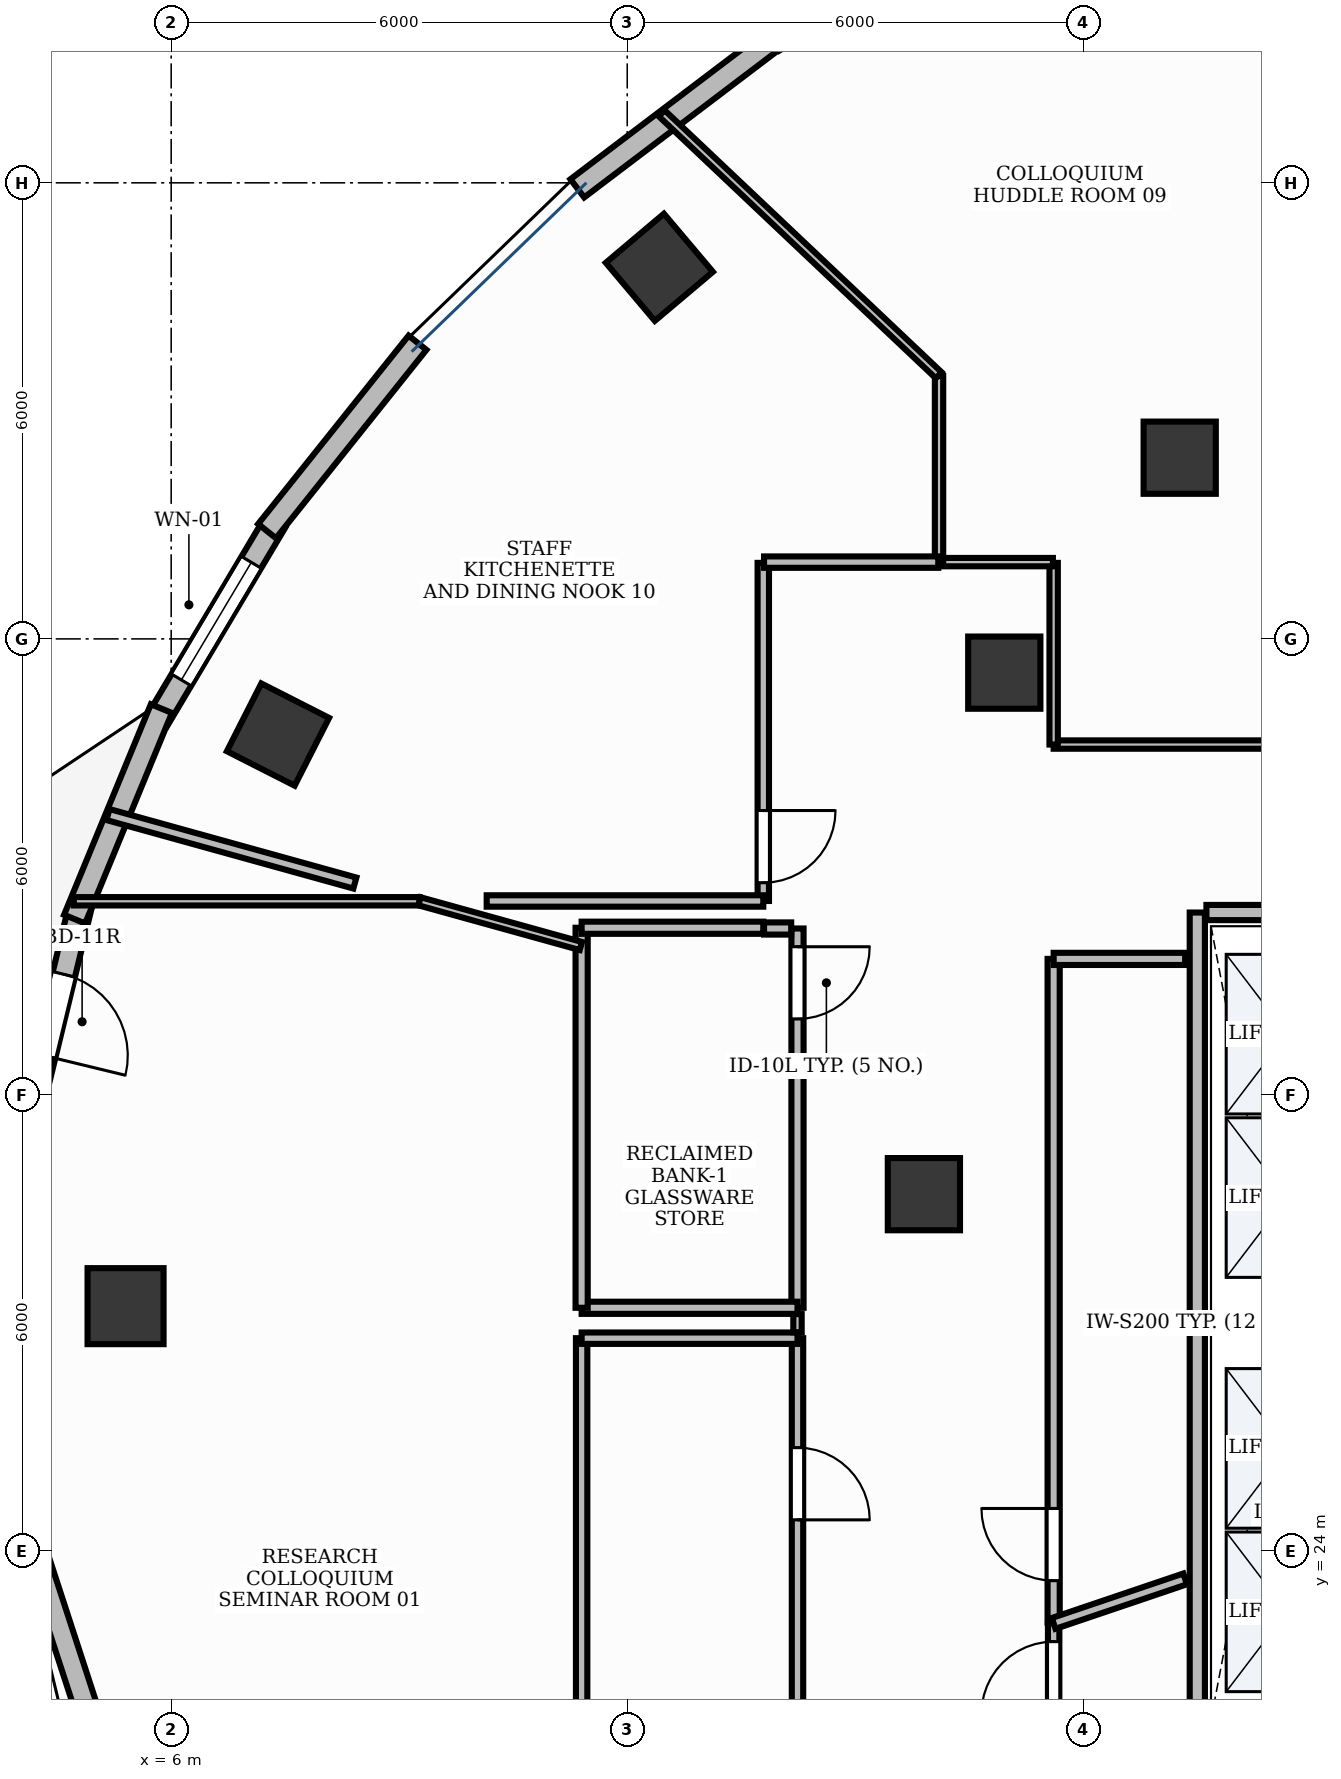
"""IFC4 building model, lengths in metres.
Left out: names, types, materials, properties, quantities, classifications, styles, units other than length and angle.
Written with IfcOpenShell. Run it as: python <this file> out.ifc"""

import sys

from ifc_helpers import new_model, si_unit, direction, frame, frame_2d, origin, origin_2d, place, context, subcontext, project, spatial, rectangle, extrude, element, fill, save


model = new_model("IFC4")
c1 = context("Model", 3, precision=1e-05, world=origin(), true_north=direction((0.0, 1.0)))
c2 = subcontext(c1, "Body", "Model", "MODEL_VIEW")
j1 = project(units=[si_unit("LENGTHUNIT", "METRE"), si_unit("PLANEANGLEUNIT", "RADIAN")], contexts=[c1])
p1 = place(None, origin())
s1 = spatial("IfcSite", under=j1, at=p1, CompositionType="ELEMENT")
p2 = place(p1, origin())
s2 = spatial("IfcBuilding", under=s1, at=p2, CompositionType="ELEMENT")
p3 = place(p2, frame((0.0, 0.0, 231.0)))
s3 = spatial("IfcBuildingStorey", under=s2, at=p3, CompositionType="ELEMENT", Elevation=231.0)
p4 = place(p3, frame((12.423, 40.889, -0.0), z_axis=(0.0, 0.0, 1.0), x_axis=(0.764246456939, 0.644924300253, 0.0)))
e1 = element("IfcColumn", 1, at=p4, inside=s3, PredefinedType="COLUMN", context=c2, shape_type="SweptSolid", body=[
    extrude(rectangle(XDim=1.0, YDim=1.0, at=origin_2d()), origin(), (0.0, 0.0, 1.0), 3.901),
])
p5 = place(p3, frame((19.268, 38.384, -0.0), z_axis=(0.0, 0.0, 1.0), x_axis=(1.0, 0.0, 0.0)))
e2 = element("IfcColumn", 2, at=p5, inside=s3, PredefinedType="COLUMN", context=c2, shape_type="SweptSolid", body=[
    extrude(rectangle(XDim=0.95, YDim=0.95, at=origin_2d()), origin(), (0.0, 0.0, 1.0), 3.901),
])
p6 = place(p3, frame((7.405, 34.741, -0.0), z_axis=(0.0, 0.0, 1.0), x_axis=(0.453057191132, 0.891481453292, 0.0)))
e3 = element("IfcColumn", 3, at=p6, inside=s3, PredefinedType="COLUMN", context=c2, shape_type="SweptSolid", body=[
    extrude(rectangle(XDim=1.0, YDim=1.0, at=origin_2d()), origin(), (0.0, 0.0, 1.0), 3.901),
])
p7 = place(p3, frame((16.96, 35.556, -0.0), z_axis=(0.0, 0.0, 1.0), x_axis=(1.0, 0.0, 0.0)))
e4 = element("IfcColumn", 4, at=p7, inside=s3, PredefinedType="COLUMN", context=c2, shape_type="SweptSolid", body=[
    extrude(rectangle(XDim=0.95, YDim=0.95, at=origin_2d()), origin(), (0.0, 0.0, 1.0), 3.901),
])
p8 = place(p3, frame((5.4, 27.222, -0.0), z_axis=(0.0, 0.0, 1.0), x_axis=(0.0, 1.0, 0.0)))
e5 = element("IfcColumn", 5, at=p8, inside=s3, PredefinedType="COLUMN", context=c2, shape_type="SweptSolid", body=[
    extrude(rectangle(XDim=1.0, YDim=1.0, at=origin_2d()), origin(), (0.0, 0.0, 1.0), 3.901),
])
p9 = place(p3, frame((15.903, 28.695, -0.0), z_axis=(0.0, 0.0, 1.0), x_axis=(1.0, 0.0, 0.0)))
e6 = element("IfcColumn", 6, at=p9, inside=s3, PredefinedType="COLUMN", context=c2, shape_type="SweptSolid", body=[
    extrude(rectangle(XDim=0.95, YDim=0.95, at=origin_2d()), origin(), (0.0, 0.0, 1.0), 3.901),
])
p10 = place(p3, frame((7.37, 37.538, 0.0), z_axis=(0.0, 0.0, 1.0), x_axis=(-0.511263271049, -0.859424148879, 0.0)))
e7 = element("IfcWall", 7, at=p10, inside=s3, PredefinedType="STANDARD", context=c2, shape_type="SweptSolid", body=[
    extrude(rectangle(XDim=3.036, YDim=0.3, at=frame_2d((1.518, 0.0))), origin(), (0.0, 0.0, 1.0), 3.47),
])
p11 = place(p10, frame((0.618, 0.0, 0.9)))
e8 = element("IfcOpeningElement", 8, at=p11, cuts=e7, PredefinedType="OPENING", context=c2, shape_type="SweptSolid", body=[
    extrude(rectangle(XDim=1.8, YDim=2.1, at=frame_2d((0.9, 1.05))), frame((0.0, 0.165, 0.0), z_axis=(0.0, -1.0, 0.0), x_axis=(1.0, 0.0, 0.0)), (0.0, 0.0, 1.0), 0.33),
])
p12 = place(p3, frame((4.8, 32.461, 0.0), z_axis=(0.0, 0.0, 1.0), x_axis=(-0.23549395731, -0.971875813091, 0.0)))
e9 = element("IfcWall", 9, at=p12, inside=s3, PredefinedType="STANDARD", context=c2, shape_type="SweptSolid", body=[
    extrude(rectangle(XDim=2.899, YDim=0.3, at=frame_2d((1.449, 0.0))), origin(), (0.0, 0.0, 1.0), 3.9),
])
p13 = place(p12, frame((0.899, 0.0, 0.0)))
e10 = element("IfcOpeningElement", 10, at=p13, cuts=e9, PredefinedType="OPENING", context=c2, shape_type="SweptSolid", body=[
    extrude(rectangle(XDim=1.1, YDim=2.15, at=frame_2d((0.55, 1.075))), frame((0.0, 0.165, 0.0), z_axis=(0.0, -1.0, 0.0), x_axis=(1.0, 0.0, 0.0)), (0.0, 0.0, 1.0), 0.33),
])
p14 = place(p3, frame((14.041, 43.973, 0.0), z_axis=(0.0, 0.0, 1.0), x_axis=(-0.796917512891, -0.604088137317, 0.0)))
e11 = element("IfcWall", 11, at=p14, inside=s3, PredefinedType="STANDARD", context=c2, shape_type="SweptSolid", body=[
    extrude(rectangle(XDim=3.385, YDim=0.3, at=frame_2d((1.693, 0.0))), origin(), (0.0, 0.0, 1.0), 3.9),
])
p15 = place(p3, frame((9.241, 39.896, 0.0), z_axis=(0.0, 0.0, 1.0), x_axis=(-0.624084641886, -0.781356742956, 0.0)))
e12 = element("IfcWall", 12, at=p15, inside=s3, PredefinedType="STANDARD", context=c2, shape_type="SweptSolid", body=[
    extrude(rectangle(XDim=3.171, YDim=0.3, at=frame_2d((1.586, 0.0))), origin(), (0.0, 0.0, 1.0), 3.47),
])
p16 = place(p3, frame((5.871, 35.083, 0.0), z_axis=(0.0, 0.0, 1.0), x_axis=(-0.380967021775, -0.924588626536, 0.0)))
e13 = element("IfcWall", 13, at=p16, inside=s3, PredefinedType="STANDARD", context=c2, shape_type="SweptSolid", body=[
    extrude(rectangle(XDim=2.996, YDim=0.3, at=frame_2d((1.498, 0.0))), origin(), (0.0, 0.0, 1.0), 3.9),
])
p17 = place(p3, frame((4.084, 24.379, 0.0), z_axis=(0.0, 0.0, 1.0), x_axis=(0.309937285623, -0.95075700312, 0.0)))
e14 = element("IfcWall", 14, at=p17, inside=s3, PredefinedType="STANDARD", context=c2, shape_type="SweptSolid", body=[
    extrude(rectangle(XDim=5.758, YDim=0.3, at=frame_2d((2.879, 0.0))), origin(), (0.0, 0.0, 1.0), 3.9),
])
p18 = place(p3, frame((19.5, 21.6, 0.0), z_axis=(0.0, 0.0, 1.0), x_axis=(0.0, 1.0, 0.0)))
e15 = element("IfcWall", 15, at=p18, inside=s3, PredefinedType="PARTITIONING", context=c2, shape_type="SweptSolid", body=[
    extrude(rectangle(XDim=10.8, YDim=0.2, at=frame_2d((5.4, 0.0))), origin(), (0.0, 0.0, 1.0), 2.91),
])
p19 = place(p3, frame((19.62, 32.4, 0.0), z_axis=(0.0, 0.0, 1.0), x_axis=(1.0, 0.0, 0.0)))
e16 = element("IfcWall", 16, at=p19, inside=s3, PredefinedType="PARTITIONING", context=c2, shape_type="SweptSolid", body=[
    extrude(rectangle(XDim=2.11, YDim=0.2, at=frame_2d((1.055, 0.0))), origin(), (0.0, 0.0, 1.0), 2.91),
])
p20 = place(p3, frame((14.24, 26.8, 0.0), z_axis=(0.0, 0.0, 1.0), x_axis=(0.0, -1.0, 0.0)))
e17 = element("IfcWall", 17, at=p20, inside=s3, PredefinedType="PARTITIONING", context=c2, shape_type="SweptSolid", body=[
    extrude(rectangle(XDim=4.99, YDim=0.15, at=frame_2d((2.495, 0.0))), origin(), (0.0, 0.0, 1.0), 2.91),
])
p21 = place(p20, frame((1.44, 0.0, 0.0)))
e18 = element("IfcOpeningElement", 18, at=p21, cuts=e17, PredefinedType="OPENING", context=c2, shape_type="SweptSolid", body=[
    extrude(rectangle(XDim=0.95, YDim=2.15, at=frame_2d((0.475, 1.075))), frame((0.0, 0.09, 0.0), z_axis=(0.0, -1.0, 0.0), x_axis=(1.0, 0.0, 0.0)), (0.0, 0.0, 1.0), 0.18),
])
p22 = place(p3, frame((14.24, 32.19, 0.0), z_axis=(0.0, 0.0, 1.0), x_axis=(0.0, -1.0, 0.0)))
e19 = element("IfcWall", 19, at=p22, inside=s3, PredefinedType="PARTITIONING", context=c2, shape_type="SweptSolid", body=[
    extrude(rectangle(XDim=4.99, YDim=0.16, at=frame_2d((2.495, 0.0))), origin(), (0.0, 0.0, 1.0), 2.91),
])
p23 = place(p22, frame((0.24, 0.0, 0.0)))
e20 = element("IfcOpeningElement", 20, at=p23, cuts=e19, PredefinedType="OPENING", context=c2, shape_type="SweptSolid", body=[
    extrude(rectangle(XDim=0.95, YDim=2.15, at=frame_2d((0.475, 1.075))), frame((0.0, 0.095, 0.0), z_axis=(0.0, -1.0, 0.0), x_axis=(1.0, 0.0, 0.0)), (0.0, 0.0, 1.0), 0.19),
])
p24 = place(p3, frame((17.61, 16.41, 0.0), z_axis=(0.0, 0.0, 1.0), x_axis=(0.0, 1.0, 0.0)))
e21 = element("IfcWall", 21, at=p24, inside=s3, PredefinedType="PARTITIONING", context=c2, shape_type="SweptSolid", body=[
    extrude(rectangle(XDim=6.638, YDim=0.15, at=frame_2d((3.319, 0.0))), origin(), (0.0, 0.0, 1.0), 2.91),
])
p25 = place(p24, frame((5.448, 0.0, 0.0)))
e22 = element("IfcOpeningElement", 22, at=p25, cuts=e21, PredefinedType="OPENING", context=c2, shape_type="SweptSolid", body=[
    extrude(rectangle(XDim=0.95, YDim=2.15, at=frame_2d((0.475, 1.075))), frame((0.0, 0.09, 0.0), z_axis=(0.0, -1.0, 0.0), x_axis=(1.0, 0.0, 0.0)), (0.0, 0.0, 1.0), 0.18),
])
p26 = place(p3, frame((13.79, 37.0, 0.0), z_axis=(0.0, 0.0, 1.0), x_axis=(0.0, -1.0, 0.0)))
e23 = element("IfcWall", 23, at=p26, inside=s3, PredefinedType="PARTITIONING", context=c2, shape_type="SweptSolid", body=[
    extrude(rectangle(XDim=4.448, YDim=0.15, at=frame_2d((2.224, 0.0))), origin(), (0.0, 0.0, 1.0), 2.91),
])
p27 = place(p26, frame((3.258, 0.0, 0.0)))
e24 = element("IfcOpeningElement", 24, at=p27, cuts=e23, PredefinedType="OPENING", context=c2, shape_type="SweptSolid", body=[
    extrude(rectangle(XDim=0.95, YDim=2.15, at=frame_2d((0.475, 1.075))), frame((0.0, 0.09, 0.0), z_axis=(0.0, -1.0, 0.0), x_axis=(1.0, 0.0, 0.0)), (0.0, 0.0, 1.0), 0.18),
])
p28 = place(p3, frame((17.61, 23.058, 0.0), z_axis=(0.0, 0.0, 1.0), x_axis=(0.0, 1.0, 0.0)))
e25 = element("IfcWall", 25, at=p28, inside=s3, PredefinedType="PARTITIONING", context=c2, shape_type="SweptSolid", body=[
    extrude(rectangle(XDim=8.732, YDim=0.16, at=frame_2d((4.366, 0.0))), origin(), (0.0, 0.0, 1.0), 2.91),
])
p29 = place(p28, frame((0.552, 0.0, 0.0)))
e26 = element("IfcOpeningElement", 26, at=p29, cuts=e25, PredefinedType="OPENING", context=c2, shape_type="SweptSolid", body=[
    extrude(rectangle(XDim=0.95, YDim=2.15, at=frame_2d((0.475, 1.075))), frame((0.0, 0.095, 0.0), z_axis=(0.0, -1.0, 0.0), x_axis=(1.0, 0.0, 0.0)), (0.0, 0.0, 1.0), 0.19),
])
p30 = place(p3, frame((11.4, 21.8, 0.0), z_axis=(0.0, 0.0, 1.0), x_axis=(0.0, 1.0, 0.0)))
e27 = element("IfcWall", 27, at=p30, inside=s3, PredefinedType="PARTITIONING", context=c2, shape_type="SweptSolid", body=[
    extrude(rectangle(XDim=5.0, YDim=0.15, at=frame_2d((2.5, 0.0))), origin(), (0.0, 0.0, 1.0), 2.91),
])
p31 = place(p3, frame((11.4, 26.8, 0.0), z_axis=(0.0, 0.0, 1.0), x_axis=(1.0, 0.0, 0.0)))
e28 = element("IfcWall", 28, at=p31, inside=s3, PredefinedType="PARTITIONING", context=c2, shape_type="SweptSolid", body=[
    extrude(rectangle(XDim=2.84, YDim=0.15, at=frame_2d((1.42, 0.0))), origin(), (0.0, 0.0, 1.0), 2.91),
])
p32 = place(p3, frame((13.8, 32.19, 0.0), z_axis=(0.0, 0.0, 1.0), x_axis=(1.0, 0.0, 0.0)))
e29 = element("IfcWall", 29, at=p32, inside=s3, PredefinedType="PARTITIONING", context=c2, shape_type="SweptSolid", body=[
    extrude(rectangle(XDim=0.357, YDim=0.16, at=frame_2d((0.178, 0.0))), origin(), (0.0, 0.0, 1.0), 2.91),
])
p33 = place(p3, frame((14.24, 27.2, 0.0), z_axis=(0.0, 0.0, 1.0), x_axis=(-1.0, 0.0, 0.0)))
e30 = element("IfcWall", 30, at=p33, inside=s3, PredefinedType="PARTITIONING", context=c2, shape_type="SweptSolid", body=[
    extrude(rectangle(XDim=2.84, YDim=0.16, at=frame_2d((1.42, 0.0))), origin(), (0.0, 0.0, 1.0), 2.91),
])
p34 = place(p3, frame((11.4, 27.2, 0.0), z_axis=(0.0, 0.0, 1.0), x_axis=(0.0, 1.0, 0.0)))
e31 = element("IfcWall", 31, at=p34, inside=s3, PredefinedType="PARTITIONING", context=c2, shape_type="SweptSolid", body=[
    extrude(rectangle(XDim=5.0, YDim=0.16, at=frame_2d((2.5, 0.0))), origin(), (0.0, 0.0, 1.0), 2.91),
])
p35 = place(p3, frame((11.4, 32.2, 0.0), z_axis=(0.0, 0.0, 1.0), x_axis=(1.0, 0.0, 0.0)))
e32 = element("IfcWall", 32, at=p35, inside=s3, PredefinedType="PARTITIONING", context=c2, shape_type="SweptSolid", body=[
    extrude(rectangle(XDim=2.39, YDim=0.16, at=frame_2d((1.195, 0.0))), origin(), (0.0, 0.0, 1.0), 2.91),
])
p36 = place(p3, frame((4.719, 32.548, 0.0), z_axis=(0.0, 0.0, 1.0), x_axis=(1.0, 0.0, 0.0)))
e33 = element("IfcWall", 33, at=p36, inside=s3, PredefinedType="MOVABLE", context=c2, shape_type="SweptSolid", body=[
    extrude(rectangle(XDim=4.548, YDim=0.11, at=frame_2d((2.274, 0.0))), origin(), (0.0, 0.0, 1.0), 2.91),
])
p37 = place(p3, frame((9.267, 32.548, 0.0), z_axis=(0.0, 0.0, 1.0), x_axis=(0.963603606823, -0.267335162141, 0.0)))
e34 = element("IfcWall", 34, at=p37, inside=s3, PredefinedType="MOVABLE", context=c2, shape_type="SweptSolid", body=[
    extrude(rectangle(XDim=2.203, YDim=0.11, at=frame_2d((1.101, 0.0))), origin(), (0.0, 0.0, 1.0), 2.91),
])
p38 = place(p3, frame((14.24, 27.117, 0.0), z_axis=(0.0, 0.0, 1.0), x_axis=(0.0, -1.0, 0.0)))
e35 = element("IfcWall", 35, at=p38, inside=s3, PredefinedType="MOVABLE", context=c2, shape_type="SweptSolid", body=[
    extrude(rectangle(XDim=0.239, YDim=0.11, at=frame_2d((0.12, 0.0))), origin(), (0.0, 0.0, 1.0), 2.91),
])
p39 = place(p3, frame((17.61, 23.048, 0.0), z_axis=(0.0, 0.0, 1.0), x_axis=(0.9472297082, 0.320555580054, 0.0)))
e36 = element("IfcWall", 36, at=p39, inside=s3, PredefinedType="PARTITIONING", context=c2, shape_type="SweptSolid", body=[
    extrude(rectangle(XDim=1.826, YDim=0.15, at=frame_2d((0.913, 0.0))), origin(), (0.0, 0.0, 1.0), 2.91),
])
p40 = place(p3, frame((22.913, 40.66, 0.0), z_axis=(0.0, 0.0, 1.0), x_axis=(-0.422622429436, 0.906305843597, 0.0)))
e37 = element("IfcWall", 37, at=p40, inside=s3, PredefinedType="PARTITIONING", context=c2, shape_type="SweptSolid", body=[
    extrude(rectangle(XDim=7.165, YDim=0.15, at=frame_2d((3.583, 0.0))), origin(), (0.0, 0.0, 1.0), 2.91),
])
p41 = place(p3, frame((21.79, 34.61, 0.0), z_axis=(0.0, 0.0, 1.0), x_axis=(-1.0, 0.0, 0.0)))
e38 = element("IfcWall", 38, at=p41, inside=s3, PredefinedType="MOVABLE", context=c2, shape_type="SweptSolid", body=[
    extrude(rectangle(XDim=4.18, YDim=0.11, at=frame_2d((2.09, 0.0))), origin(), (0.0, 0.0, 1.0), 2.91),
])
p42 = place(p3, frame((17.61, 34.61, 0.0), z_axis=(0.0, 0.0, 1.0), x_axis=(0.0, 1.0, 0.0)))
e39 = element("IfcWall", 39, at=p42, inside=s3, PredefinedType="MOVABLE", context=c2, shape_type="SweptSolid", body=[
    extrude(rectangle(XDim=2.39, YDim=0.11, at=frame_2d((1.195, 0.0))), origin(), (0.0, 0.0, 1.0), 2.91),
])
p43 = place(p3, frame((17.6, 37.01, 0.0), z_axis=(0.0, 0.0, 1.0), x_axis=(-1.0, 0.0, 0.0)))
e40 = element("IfcWall", 40, at=p43, inside=s3, PredefinedType="MOVABLE", context=c2, shape_type="SweptSolid", body=[
    extrude(rectangle(XDim=1.498, YDim=0.11, at=frame_2d((0.749, 0.0))), origin(), (0.0, 0.0, 1.0), 2.91),
])
p44 = place(p3, frame((16.102, 37.01, 0.0), z_axis=(0.0, 0.0, 1.0), x_axis=(0.0, 1.0, 0.0)))
e41 = element("IfcWall", 41, at=p44, inside=s3, PredefinedType="MOVABLE", context=c2, shape_type="SweptSolid", body=[
    extrude(rectangle(XDim=2.449, YDim=0.11, at=frame_2d((1.225, 0.0))), origin(), (0.0, 0.0, 1.0), 2.91),
])
p45 = place(p3, frame((16.098, 39.469, 0.0), z_axis=(0.0, 0.0, 1.0), x_axis=(-0.72659054889, 0.687070719987, 0.0)))
e42 = element("IfcWall", 42, at=p45, inside=s3, PredefinedType="MOVABLE", context=c2, shape_type="SweptSolid", body=[
    extrude(rectangle(XDim=5.016, YDim=0.11, at=frame_2d((2.508, 0.0))), origin(), (0.0, 0.0, 1.0), 2.91),
])
p46 = place(p3, frame((16.092, 37.01, 0.0), z_axis=(0.0, 0.0, 1.0), x_axis=(-1.0, 0.0, 0.0)))
e43 = element("IfcWall", 43, at=p46, inside=s3, PredefinedType="PARTITIONING", context=c2, shape_type="SweptSolid", body=[
    extrude(rectangle(XDim=2.292, YDim=0.15, at=frame_2d((1.146, 0.0))), origin(), (0.0, 0.0, 1.0), 2.91),
])
p47 = place(p3, frame((13.79, 32.552, 0.0), z_axis=(0.0, 0.0, 1.0), x_axis=(-1.0, 0.0, 0.0)))
e44 = element("IfcWall", 44, at=p47, inside=s3, PredefinedType="PARTITIONING", context=c2, shape_type="SweptSolid", body=[
    extrude(rectangle(XDim=3.639, YDim=0.15, at=frame_2d((1.82, 0.0))), origin(), (0.0, 0.0, 1.0), 2.91),
])
p48 = place(p3, frame((8.417, 32.788, 0.0), z_axis=(0.0, 0.0, 1.0), x_axis=(-0.963635086901, 0.267221666961, 0.0)))
e45 = element("IfcWall", 45, at=p48, inside=s3, PredefinedType="PARTITIONING", context=c2, shape_type="SweptSolid", body=[
    extrude(rectangle(XDim=3.37, YDim=0.15, at=frame_2d((1.685, 0.0))), origin(), (0.0, 0.0, 1.0), 2.91),
])
p49 = place(p3, frame((17.61, 31.79, 0.0), z_axis=(0.0, 0.0, 1.0), x_axis=(1.0, 0.0, 0.0)))
e46 = element("IfcWall", 46, at=p49, inside=s3, PredefinedType="PARTITIONING", context=c2, shape_type="SweptSolid", body=[
    extrude(rectangle(XDim=1.73, YDim=0.16, at=frame_2d((0.865, 0.0))), origin(), (0.0, 0.0, 1.0), 2.91),
])
p50 = place(p11, origin())
e47 = element("IfcWindow", 47, at=p50, inside=s3, PartitioningType="SINGLE_PANEL", PredefinedType="WINDOW", context=c2, shape_type="SweptSolid", body=[
    extrude(rectangle(XDim=1.8, YDim=2.1, at=frame_2d((0.9, 1.05))), frame((0.0, 0.03, 0.0), z_axis=(0.0, -1.0, 0.0), x_axis=(1.0, 0.0, 0.0)), (0.0, 0.0, 1.0), 0.06),
])
fill(e8, e47)
p51 = place(p13, origin())
e48 = element("IfcDoor", 48, at=p51, inside=s3, OperationType="SINGLE_SWING_RIGHT", PredefinedType="DOOR", context=c2, shape_type="SweptSolid", body=[
    extrude(rectangle(XDim=1.1, YDim=2.15, at=frame_2d((0.55, 1.075))), frame((0.0, 0.025, 0.0), z_axis=(0.0, -1.0, 0.0), x_axis=(1.0, 0.0, 0.0)), (0.0, 0.0, 1.0), 0.05),
])
fill(e10, e48)
p52 = place(p21, origin())
e49 = element("IfcDoor", 49, at=p52, inside=s3, OperationType="SINGLE_SWING_RIGHT", PredefinedType="DOOR", context=c2, shape_type="SweptSolid", body=[
    extrude(rectangle(XDim=0.95, YDim=2.15, at=frame_2d((0.475, 1.075))), frame((0.0, 0.025, 0.0), z_axis=(0.0, -1.0, 0.0), x_axis=(1.0, 0.0, 0.0)), (0.0, 0.0, 1.0), 0.05),
])
fill(e18, e49)
p53 = place(p23, origin())
e50 = element("IfcDoor", 50, at=p53, inside=s3, OperationType="SINGLE_SWING_LEFT", PredefinedType="DOOR", context=c2, shape_type="SweptSolid", body=[
    extrude(rectangle(XDim=0.95, YDim=2.15, at=frame_2d((0.475, 1.075))), frame((0.0, 0.025, 0.0), z_axis=(0.0, -1.0, 0.0), x_axis=(1.0, 0.0, 0.0)), (0.0, 0.0, 1.0), 0.05),
])
fill(e20, e50)
p54 = place(p25, origin())
e51 = element("IfcDoor", 51, at=p54, inside=s3, OperationType="SINGLE_SWING_LEFT", PredefinedType="DOOR", context=c2, shape_type="SweptSolid", body=[
    extrude(rectangle(XDim=0.95, YDim=2.15, at=frame_2d((0.475, 1.075))), frame((0.0, 0.025, 0.0), z_axis=(0.0, -1.0, 0.0), x_axis=(1.0, 0.0, 0.0)), (0.0, 0.0, 1.0), 0.05),
])
fill(e22, e51)
p55 = place(p27, origin())
e52 = element("IfcDoor", 52, at=p55, inside=s3, OperationType="SINGLE_SWING_LEFT", PredefinedType="DOOR", context=c2, shape_type="SweptSolid", body=[
    extrude(rectangle(XDim=0.95, YDim=2.15, at=frame_2d((0.475, 1.075))), frame((0.0, 0.025, 0.0), z_axis=(0.0, -1.0, 0.0), x_axis=(1.0, 0.0, 0.0)), (0.0, 0.0, 1.0), 0.05),
])
fill(e24, e52)
p56 = place(p29, origin())
e53 = element("IfcDoor", 53, at=p56, inside=s3, OperationType="SINGLE_SWING_RIGHT", PredefinedType="DOOR", context=c2, shape_type="SweptSolid", body=[
    extrude(rectangle(XDim=0.95, YDim=2.15, at=frame_2d((0.475, 1.075))), frame((0.0, 0.025, 0.0), z_axis=(0.0, -1.0, 0.0), x_axis=(1.0, 0.0, 0.0)), (0.0, 0.0, 1.0), 0.05),
])
fill(e26, e53)
save(model, sys.argv[1])
